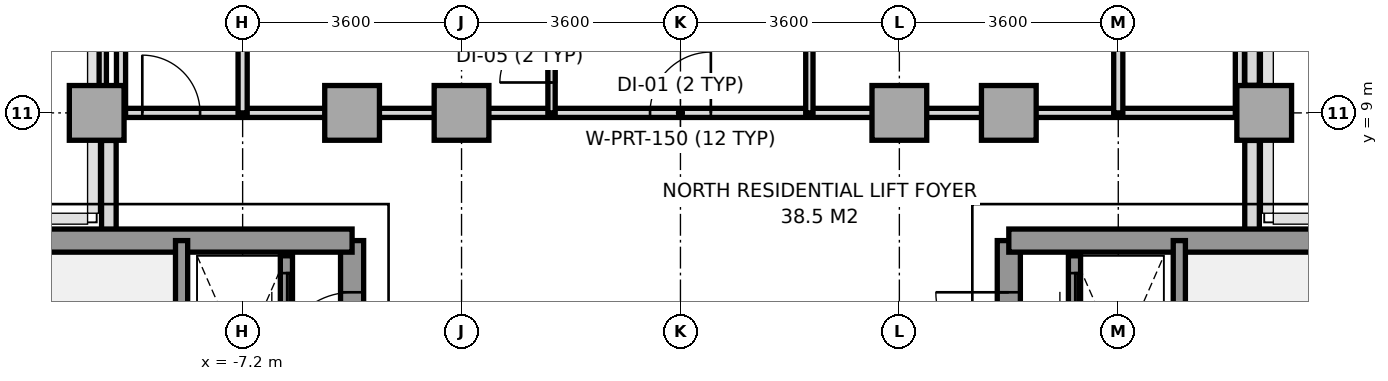
"""IFC4 building model, lengths in metres.
Left out: names, types, materials, properties, quantities, classifications, styles, units other than length and angle.
Written with IfcOpenShell. Run it as: python <this file> out.ifc"""

import sys

from ifc_helpers import new_model, si_unit, direction, frame, frame_2d, origin, origin_2d, place, context, subcontext, project, spatial, rectangle, extrude, source, transform, mapped, element, fill, save


model = new_model("IFC4")
c1 = context("Model", 3, precision=1e-05, world=origin(), true_north=direction((0.0, 1.0)))
c2 = subcontext(c1, "Body", "Model", "MODEL_VIEW")
j1 = project(units=[si_unit("LENGTHUNIT", "METRE"), si_unit("PLANEANGLEUNIT", "RADIAN")], contexts=[c1])
p1 = place(None, origin())
s1 = spatial("IfcSite", under=j1, at=p1, CompositionType="ELEMENT")
p2 = place(p1, origin())
s2 = spatial("IfcBuilding", under=s1, at=p2, CompositionType="ELEMENT")
p3 = place(p2, frame((0.0, 0.0, 211.4)))
s3 = spatial("IfcBuildingStorey", under=s2, at=p3, CompositionType="ELEMENT", Elevation=211.4)
m1 = source(origin(), c2, "Body", "SweptSolid", [
    extrude(rectangle(XDim=0.9, YDim=0.9, at=origin_2d()), origin(), (0.0, 0.0, 1.0), 3.14),
])
for number, where, z_axis, x_axis in (
    (1, (-9.6, 9.0, 0.0), (0.0, 0.0, 1.0), (1.0, 0.0, 0.0)),
    (2, (-5.4, 9.0, 0.0), (0.0, 0.0, 1.0), (1.0, 0.0, 0.0)),
    (3, (-3.6, 9.0, 0.0), (0.0, 0.0, 1.0), (1.0, 0.0, 0.0)),
    (4, (3.6, 9.0, 0.0), (0.0, 0.0, 1.0), (1.0, 0.0, 0.0)),
    (5, (5.4, 9.0, 0.0), (0.0, 0.0, 1.0), (1.0, 0.0, 0.0)),
    (6, (9.6, 9.0, 0.0), (0.0, 0.0, 1.0), (1.0, 0.0, 0.0)),
):
    element("IfcColumn", number, at=place(p3, frame(where, z_axis=z_axis, x_axis=x_axis)), inside=s3, PredefinedType="COLUMN", context=c2, shape_type="MappedRepresentation", body=[
        mapped(m1, transform((0.0, 0.0, 0.0), x_axis=(1.0, 0.0, 0.0), y_axis=(0.0, 1.0, 0.0), z_axis=(0.0, 0.0, 1.0), scale=1.0)),
    ])
p4 = place(p3, frame((-9.4, 6.953, 0.0), z_axis=(0.0, 0.0, 1.0), x_axis=(0.0, 1.0, 0.0)))
e7 = element("IfcWall", 7, at=p4, inside=s3, PredefinedType="PARAPET", context=c2, shape_type="SweptSolid", body=[
    extrude(rectangle(XDim=1.594, YDim=0.24, at=frame_2d((0.797, 0.0))), origin(), (0.0, 0.0, 1.0), 1.15),
])
p5 = place(p3, frame((9.4, 15.358, 0.0), z_axis=(0.0, 0.0, 1.0), x_axis=(0.0, -1.0, 0.0)))
e8 = element("IfcWall", 8, at=p5, inside=s3, PredefinedType="PARAPET", context=c2, shape_type="SweptSolid", body=[
    extrude(rectangle(XDim=5.905, YDim=0.24, at=frame_2d((2.952, 0.0))), origin(), (0.0, 0.0, 1.0), 1.15),
])
p6 = place(p3, frame((9.4, 8.547, 0.0), z_axis=(0.0, 0.0, 1.0), x_axis=(0.0, -1.0, 0.0)))
e9 = element("IfcWall", 9, at=p6, inside=s3, PredefinedType="PARAPET", context=c2, shape_type="SweptSolid", body=[
    extrude(rectangle(XDim=1.594, YDim=0.24, at=frame_2d((0.797, 0.0))), origin(), (0.0, 0.0, 1.0), 1.15),
])
p7 = place(p3, frame((-5.4, -5.6, 0.0), z_axis=(0.0, 0.0, 1.0), x_axis=(0.0, 1.0, 0.0)))
e10 = element("IfcWall", 10, at=p7, inside=s3, PredefinedType="SHEAR", context=c2, shape_type="SweptSolid", body=[
    extrude(rectangle(XDim=12.5, YDim=0.38, at=frame_2d((6.25, 0.0))), origin(), (0.0, 0.0, 1.0), 3.14),
])
p8 = place(p7, frame((4.55, 0.0, 0.0)))
e11 = element("IfcOpeningElement", 11, at=p8, cuts=e10, PredefinedType="OPENING", context=c2, shape_type="SweptSolid", body=[
    extrude(rectangle(XDim=1.2, YDim=2.2, at=frame_2d((0.6, 1.1))), frame((0.0, 0.2, 0.0), z_axis=(0.0, -1.0, 0.0), x_axis=(1.0, 0.0, 0.0)), (0.0, 0.0, 1.0), 0.4),
])
p9 = place(p7, frame((10.45, 0.0, 0.0)))
e12 = element("IfcOpeningElement", 12, at=p9, cuts=e10, PredefinedType="OPENING", context=c2, shape_type="SweptSolid", body=[
    extrude(rectangle(XDim=1.2, YDim=2.2, at=frame_2d((0.6, 1.1))), frame((0.0, 0.2, 0.0), z_axis=(0.0, -1.0, 0.0), x_axis=(1.0, 0.0, 0.0)), (0.0, 0.0, 1.0), 0.4),
])
p10 = place(p7, frame((6.86, 0.0, 0.0)))
e13 = element("IfcOpeningElement", 13, at=p10, cuts=e10, PredefinedType="OPENING", context=c2, shape_type="SweptSolid", body=[
    extrude(rectangle(XDim=0.8, YDim=2.1, at=frame_2d((0.4, 1.05))), frame((0.0, 0.2, 0.0), z_axis=(0.0, -1.0, 0.0), x_axis=(1.0, 0.0, 0.0)), (0.0, 0.0, 1.0), 0.4),
])
p11 = place(p3, frame((-11.356, 6.9, 0.0), z_axis=(0.0, 0.0, 1.0), x_axis=(1.0, 0.0, 0.0)))
e14 = element("IfcWall", 14, at=p11, inside=s3, PredefinedType="SHEAR", context=c2, shape_type="SweptSolid", body=[
    extrude(rectangle(XDim=5.956, YDim=0.38, at=frame_2d((2.978, 0.0))), origin(), (0.0, 0.0, 1.0), 3.14),
])
p12 = place(p3, frame((-8.204, -0.016, 0.0), z_axis=(0.0, 0.0, 1.0), x_axis=(0.0, 1.0, 0.0)))
e15 = element("IfcWall", 15, at=p12, inside=s3, PredefinedType="SOLIDWALL", context=c2, shape_type="SweptSolid", body=[
    extrude(rectangle(XDim=6.916, YDim=0.2, at=frame_2d((3.458, 0.0))), origin(), (0.0, 0.0, 1.0), 3.14),
])
p13 = place(p12, frame((0.2, 0.0, 0.0)))
e16 = element("IfcOpeningElement", 16, at=p13, cuts=e15, PredefinedType="OPENING", context=c2, shape_type="SweptSolid", body=[
    extrude(rectangle(XDim=1.2, YDim=2.2, at=frame_2d((0.6, 1.1))), frame((0.0, 0.11, 0.0), z_axis=(0.0, -1.0, 0.0), x_axis=(1.0, 0.0, 0.0)), (0.0, 0.0, 1.0), 0.22),
])
p14 = place(p3, frame((5.4, -5.6, 0.0), z_axis=(0.0, 0.0, 1.0), x_axis=(0.0, 1.0, 0.0)))
e17 = element("IfcWall", 17, at=p14, inside=s3, PredefinedType="SHEAR", context=c2, shape_type="SweptSolid", body=[
    extrude(rectangle(XDim=12.5, YDim=0.38, at=frame_2d((6.25, 0.0))), origin(), (0.0, 0.0, 1.0), 3.14),
])
p15 = place(p14, frame((4.55, 0.0, 0.0)))
e18 = element("IfcOpeningElement", 18, at=p15, cuts=e17, PredefinedType="OPENING", context=c2, shape_type="SweptSolid", body=[
    extrude(rectangle(XDim=1.2, YDim=2.2, at=frame_2d((0.6, 1.1))), frame((0.0, 0.2, 0.0), z_axis=(0.0, -1.0, 0.0), x_axis=(1.0, 0.0, 0.0)), (0.0, 0.0, 1.0), 0.4),
])
p16 = place(p14, frame((10.45, 0.0, 0.0)))
e19 = element("IfcOpeningElement", 19, at=p16, cuts=e17, PredefinedType="OPENING", context=c2, shape_type="SweptSolid", body=[
    extrude(rectangle(XDim=1.2, YDim=2.2, at=frame_2d((0.6, 1.1))), frame((0.0, 0.2, 0.0), z_axis=(0.0, -1.0, 0.0), x_axis=(1.0, 0.0, 0.0)), (0.0, 0.0, 1.0), 0.4),
])
p17 = place(p14, frame((6.86, 0.0, 0.0)))
e20 = element("IfcOpeningElement", 20, at=p17, cuts=e17, PredefinedType="OPENING", context=c2, shape_type="SweptSolid", body=[
    extrude(rectangle(XDim=0.8, YDim=2.1, at=frame_2d((0.4, 1.05))), frame((0.0, 0.2, 0.0), z_axis=(0.0, -1.0, 0.0), x_axis=(1.0, 0.0, 0.0)), (0.0, 0.0, 1.0), 0.4),
])
p18 = place(p3, frame((5.4, 6.9, 0.0), z_axis=(0.0, 0.0, 1.0), x_axis=(1.0, 0.0, 0.0)))
e21 = element("IfcWall", 21, at=p18, inside=s3, PredefinedType="SHEAR", context=c2, shape_type="SweptSolid", body=[
    extrude(rectangle(XDim=5.956, YDim=0.38, at=frame_2d((2.978, 0.0))), origin(), (0.0, 0.0, 1.0), 3.14),
])
p19 = place(p3, frame((8.204, -0.016, 0.0), z_axis=(0.0, 0.0, 1.0), x_axis=(0.0, 1.0, 0.0)))
e22 = element("IfcWall", 22, at=p19, inside=s3, PredefinedType="SOLIDWALL", context=c2, shape_type="SweptSolid", body=[
    extrude(rectangle(XDim=6.916, YDim=0.2, at=frame_2d((3.458, 0.0))), origin(), (0.0, 0.0, 1.0), 3.14),
])
p20 = place(p19, frame((0.2, 0.0, 0.0)))
e23 = element("IfcOpeningElement", 23, at=p20, cuts=e22, PredefinedType="OPENING", context=c2, shape_type="SweptSolid", body=[
    extrude(rectangle(XDim=1.2, YDim=2.2, at=frame_2d((0.6, 1.1))), frame((0.0, 0.11, 0.0), z_axis=(0.0, -1.0, 0.0), x_axis=(1.0, 0.0, 0.0)), (0.0, 0.0, 1.0), 0.22),
])
p21 = place(p3, frame((-6.48, 4.98, 0.0), z_axis=(0.0, 0.0, 1.0), x_axis=(0.0, 1.0, 0.0)))
e24 = element("IfcWall", 24, at=p21, inside=s3, PredefinedType="SOLIDWALL", context=c2, shape_type="SweptSolid", body=[
    extrude(rectangle(XDim=1.67, YDim=0.2, at=frame_2d((0.835, 0.0))), origin(), (0.0, 0.0, 1.0), 3.14),
])
p22 = place(p21, frame((0.285, 0.0, 0.0)))
e25 = element("IfcOpeningElement", 25, at=p22, cuts=e24, PredefinedType="OPENING", context=c2, shape_type="SweptSolid", body=[
    extrude(rectangle(XDim=1.1, YDim=2.2, at=frame_2d((0.55, 1.1))), frame((0.0, 0.11, 0.0), z_axis=(0.0, -1.0, 0.0), x_axis=(1.0, 0.0, 0.0)), (0.0, 0.0, 1.0), 0.22),
])
p23 = place(p3, frame((6.48, 4.98, 0.0), z_axis=(0.0, 0.0, 1.0), x_axis=(0.0, 1.0, 0.0)))
e26 = element("IfcWall", 26, at=p23, inside=s3, PredefinedType="SOLIDWALL", context=c2, shape_type="SweptSolid", body=[
    extrude(rectangle(XDim=1.67, YDim=0.2, at=frame_2d((0.835, 0.0))), origin(), (0.0, 0.0, 1.0), 3.14),
])
p24 = place(p23, frame((0.285, 0.0, 0.0)))
e27 = element("IfcOpeningElement", 27, at=p24, cuts=e26, PredefinedType="OPENING", context=c2, shape_type="SweptSolid", body=[
    extrude(rectangle(XDim=1.1, YDim=2.2, at=frame_2d((0.55, 1.1))), frame((0.0, 0.11, 0.0), z_axis=(0.0, -1.0, 0.0), x_axis=(1.0, 0.0, 0.0)), (0.0, 0.0, 1.0), 0.22),
])
p25 = place(p3, frame((-9.55, 9.0, 0.0), z_axis=(0.0, 0.0, 1.0), x_axis=(1.0, 0.0, 0.0)))
e28 = element("IfcWall", 28, at=p25, inside=s3, PredefinedType="PARTITIONING", context=c2, shape_type="SweptSolid", body=[
    extrude(rectangle(XDim=19.1, YDim=0.15, at=frame_2d((9.55, 0.0))), origin(), (0.0, 0.0, 1.0), 2.69),
])
p26 = place(p25, frame((0.7, 0.0, 0.0)))
e29 = element("IfcOpeningElement", 29, at=p26, cuts=e28, PredefinedType="OPENING", context=c2, shape_type="SweptSolid", body=[
    extrude(rectangle(XDim=0.95, YDim=2.15, at=frame_2d((0.475, 1.075))), frame((0.0, 0.085, 0.0), z_axis=(0.0, -1.0, 0.0), x_axis=(1.0, 0.0, 0.0)), (0.0, 0.0, 1.0), 0.17),
])
p27 = place(p25, frame((9.05, 0.0, 0.0)))
e30 = element("IfcOpeningElement", 30, at=p27, cuts=e28, PredefinedType="OPENING", context=c2, shape_type="SweptSolid", body=[
    extrude(rectangle(XDim=1.0, YDim=2.2, at=frame_2d((0.5, 1.1))), frame((0.0, 0.085, 0.0), z_axis=(0.0, -1.0, 0.0), x_axis=(1.0, 0.0, 0.0)), (0.0, 0.0, 1.0), 0.17),
])
for number, where, z_axis, x_axis in (
    (31, (-9.2, 9.0, 0.0), (0.0, 0.0, 1.0), (0.0, 1.0, 0.0)),
    (32, (9.2, 9.0, 0.0), (0.0, 0.0, 1.0), (0.0, 1.0, 0.0)),
):
    element("IfcWall", number, at=place(p3, frame(where, z_axis=z_axis, x_axis=x_axis)), inside=s3, PredefinedType="PARTITIONING", context=c2, shape_type="SweptSolid", body=[
        extrude(rectangle(XDim=6.68, YDim=0.15, at=frame_2d((3.34, 0.0))), origin(), (0.0, 0.0, 1.0), 2.69),
    ])
for number, where, z_axis, x_axis in (
    (33, (-7.2, 9.0, 0.0), (0.0, 0.0, 1.0), (0.0, 1.0, 0.0)),
    (34, (7.2, 9.0, 0.0), (0.0, 0.0, 1.0), (0.0, 1.0, 0.0)),
):
    element("IfcWall", number, at=place(p3, frame(where, z_axis=z_axis, x_axis=x_axis)), inside=s3, PredefinedType="PARTITIONING", context=c2, shape_type="SweptSolid", body=[
        extrude(rectangle(XDim=12.02, YDim=0.15, at=frame_2d((6.01, 0.0))), origin(), (0.0, 0.0, 1.0), 2.69),
    ])
p28 = place(p3, frame((-2.12, 9.0, 0.0), z_axis=(0.0, 0.0, 1.0), x_axis=(0.0, 1.0, 0.0)))
e35 = element("IfcWall", 35, at=p28, inside=s3, PredefinedType="PARTITIONING", context=c2, shape_type="SweptSolid", body=[
    extrude(rectangle(XDim=6.6, YDim=0.12, at=frame_2d((3.3, 0.0))), origin(), (0.0, 0.0, 1.0), 2.69),
])
p29 = place(p28, frame((0.5, 0.0, 0.0)))
e36 = element("IfcOpeningElement", 36, at=p29, cuts=e35, PredefinedType="OPENING", context=c2, shape_type="SweptSolid", body=[
    extrude(rectangle(XDim=0.85, YDim=2.1, at=frame_2d((0.425, 1.05))), frame((0.0, 0.07, 0.0), z_axis=(0.0, -1.0, 0.0), x_axis=(1.0, 0.0, 0.0)), (0.0, 0.0, 1.0), 0.14),
])
p30 = place(p28, frame((5.15, 0.0, 0.0)))
e37 = element("IfcOpeningElement", 37, at=p30, cuts=e35, PredefinedType="OPENING", context=c2, shape_type="SweptSolid", body=[
    extrude(rectangle(XDim=0.95, YDim=2.15, at=frame_2d((0.475, 1.075))), frame((0.0, 0.07, 0.0), z_axis=(0.0, -1.0, 0.0), x_axis=(1.0, 0.0, 0.0)), (0.0, 0.0, 1.0), 0.14),
])
p31 = place(p3, frame((2.12, 9.0, 0.0), z_axis=(0.0, 0.0, 1.0), x_axis=(0.0, 1.0, 0.0)))
e38 = element("IfcWall", 38, at=p31, inside=s3, PredefinedType="PARTITIONING", context=c2, shape_type="SweptSolid", body=[
    extrude(rectangle(XDim=6.6, YDim=0.12, at=frame_2d((3.3, 0.0))), origin(), (0.0, 0.0, 1.0), 2.69),
])
p32 = place(p31, frame((1.6, 0.0, 0.0)))
e39 = element("IfcOpeningElement", 39, at=p32, cuts=e38, PredefinedType="OPENING", context=c2, shape_type="SweptSolid", body=[
    extrude(rectangle(XDim=0.95, YDim=2.15, at=frame_2d((0.475, 1.075))), frame((0.0, 0.07, 0.0), z_axis=(0.0, -1.0, 0.0), x_axis=(1.0, 0.0, 0.0)), (0.0, 0.0, 1.0), 0.14),
])
p33 = place(p3, frame((-9.5, 9.0, 0.0), z_axis=(0.0, 0.0, 1.0), x_axis=(0.0, 1.0, 0.0)))
e40 = element("IfcWall", 40, at=p33, inside=s3, PredefinedType="PARTITIONING", context=c2, shape_type="SweptSolid", body=[
    extrude(rectangle(XDim=4.2, YDim=0.12, at=frame_2d((2.1, 0.0))), origin(), (0.0, 0.0, 1.0), 3.14),
])
m2 = source(origin(), c2, "Body", "SweptSolid", [
    extrude(rectangle(XDim=1.2, YDim=2.2, at=frame_2d((0.6, 1.1))), frame((0.0, 0.025, 0.0), z_axis=(0.0, -1.0, 0.0), x_axis=(1.0, 0.0, 0.0)), (0.0, 0.0, 1.0), 0.05),
])
p34 = place(p9, origin())
e41 = element("IfcDoor", 41, at=p34, inside=s3, OperationType="SINGLE_SWING_LEFT", PredefinedType="DOOR", context=c2, shape_type="MappedRepresentation", body=[
    mapped(m2, transform((0.0, 0.0, 0.0), x_axis=(1.0, 0.0, 0.0), y_axis=(0.0, 1.0, 0.0), z_axis=(0.0, 0.0, 1.0), scale=1.0)),
])
fill(e12, e41)
p35 = place(p16, origin())
e42 = element("IfcDoor", 42, at=p35, inside=s3, OperationType="SINGLE_SWING_RIGHT", PredefinedType="DOOR", context=c2, shape_type="MappedRepresentation", body=[
    mapped(m2, transform((0.0, 0.0, 0.0), x_axis=(1.0, 0.0, 0.0), y_axis=(0.0, 1.0, 0.0), z_axis=(0.0, 0.0, 1.0), scale=1.0)),
])
fill(e19, e42)
m3 = source(origin(), c2, "Body", "SweptSolid", [
    extrude(rectangle(XDim=1.1, YDim=2.2, at=frame_2d((0.55, 1.1))), frame((0.0, 0.025, 0.0), z_axis=(0.0, -1.0, 0.0), x_axis=(1.0, 0.0, 0.0)), (0.0, 0.0, 1.0), 0.05),
])
p36 = place(p22, origin())
e43 = element("IfcDoor", 43, at=p36, inside=s3, OperationType="SLIDING_TO_LEFT", PredefinedType="DOOR", context=c2, shape_type="MappedRepresentation", body=[
    mapped(m3, transform((0.0, 0.0, 0.0), x_axis=(1.0, 0.0, 0.0), y_axis=(0.0, 1.0, 0.0), z_axis=(0.0, 0.0, 1.0), scale=1.0)),
])
fill(e25, e43)
p37 = place(p24, origin())
e44 = element("IfcDoor", 44, at=p37, inside=s3, OperationType="SLIDING_TO_LEFT", PredefinedType="DOOR", context=c2, shape_type="MappedRepresentation", body=[
    mapped(m3, transform((0.0, 0.0, 0.0), x_axis=(1.0, 0.0, 0.0), y_axis=(0.0, 1.0, 0.0), z_axis=(0.0, 0.0, 1.0), scale=1.0)),
])
fill(e27, e44)
m4 = source(origin(), c2, "Body", "SweptSolid", [
    extrude(rectangle(XDim=0.95, YDim=2.15, at=frame_2d((0.475, 1.075))), frame((0.0, 0.025, 0.0), z_axis=(0.0, -1.0, 0.0), x_axis=(1.0, 0.0, 0.0)), (0.0, 0.0, 1.0), 0.05),
])
p38 = place(p26, origin())
e45 = element("IfcDoor", 45, at=p38, inside=s3, OperationType="SINGLE_SWING_LEFT", PredefinedType="DOOR", context=c2, shape_type="MappedRepresentation", body=[
    mapped(m4, transform((0.0, 0.0, 0.0), x_axis=(1.0, 0.0, 0.0), y_axis=(0.0, 1.0, 0.0), z_axis=(0.0, 0.0, 1.0), scale=1.0)),
])
fill(e29, e45)
m5 = source(origin(), c2, "Body", "SweptSolid", [
    extrude(rectangle(XDim=1.0, YDim=2.2, at=frame_2d((0.5, 1.1))), frame((0.0, 0.025, 0.0), z_axis=(0.0, -1.0, 0.0), x_axis=(1.0, 0.0, 0.0)), (0.0, 0.0, 1.0), 0.05),
])
p39 = place(p27, origin())
e46 = element("IfcDoor", 46, at=p39, inside=s3, OperationType="SINGLE_SWING_RIGHT", PredefinedType="DOOR", context=c2, shape_type="MappedRepresentation", body=[
    mapped(m5, transform((0.0, 0.0, 0.0), x_axis=(1.0, 0.0, 0.0), y_axis=(0.0, 1.0, 0.0), z_axis=(0.0, 0.0, 1.0), scale=1.0)),
])
fill(e30, e46)
m6 = source(origin(), c2, "Body", "SweptSolid", [
    extrude(rectangle(XDim=0.85, YDim=2.1, at=frame_2d((0.425, 1.05))), frame((0.0, 0.025, 0.0), z_axis=(0.0, -1.0, 0.0), x_axis=(1.0, 0.0, 0.0)), (0.0, 0.0, 1.0), 0.05),
])
p40 = place(p29, origin())
e47 = element("IfcDoor", 47, at=p40, inside=s3, OperationType="SINGLE_SWING_LEFT", PredefinedType="DOOR", context=c2, shape_type="MappedRepresentation", body=[
    mapped(m6, transform((0.0, 0.0, 0.0), x_axis=(1.0, 0.0, 0.0), y_axis=(0.0, 1.0, 0.0), z_axis=(0.0, 0.0, 1.0), scale=1.0)),
])
fill(e36, e47)
save(model, sys.argv[1])
